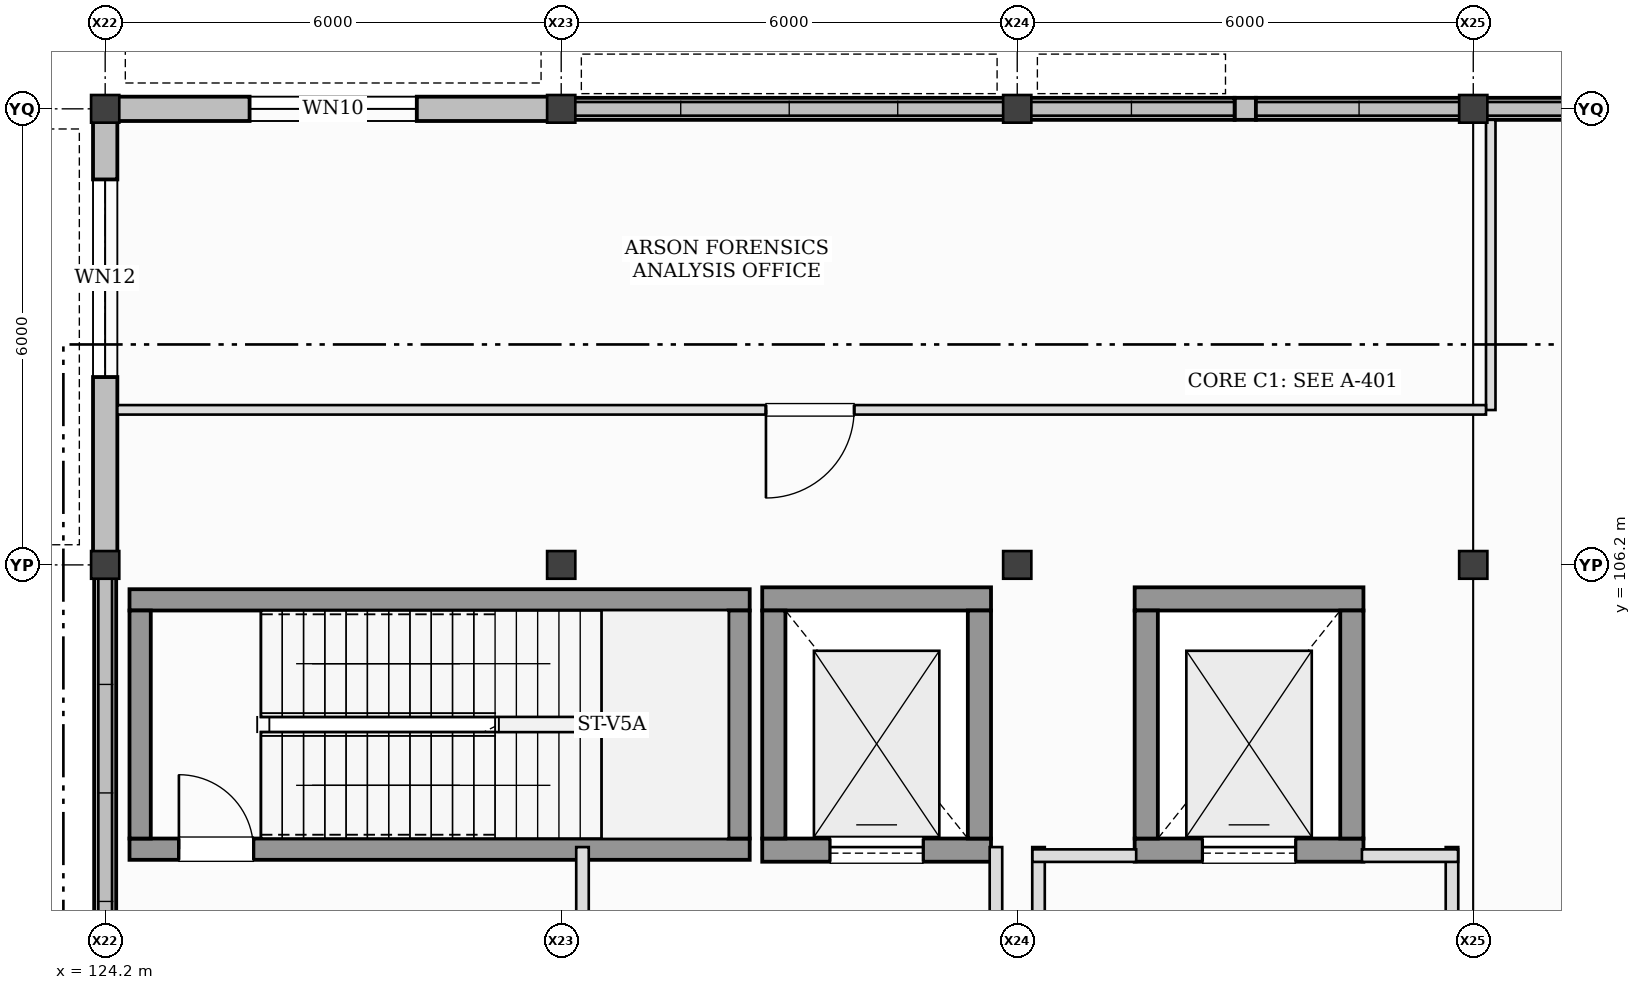
"""IFC4 building model, lengths in metres.
Left out: names, types, materials, properties, quantities, classifications, styles, units other than length and angle.
Written with IfcOpenShell. Run it as: python <this file> out.ifc"""

import sys

from ifc_helpers import new_model, si_unit, direction, frame, frame_2d, origin, origin_2d, place, context, subcontext, project, spatial, rectangle, i_section, extrude, element, fill, save


model = new_model("IFC4")
c1 = context("Model", 3, precision=1e-05, world=origin(), true_north=direction((0.0, 1.0)))
c2 = subcontext(c1, "Body", "Model", "MODEL_VIEW")
j1 = project(units=[si_unit("LENGTHUNIT", "METRE"), si_unit("PLANEANGLEUNIT", "RADIAN")], contexts=[c1])
p1 = place(None, origin())
s1 = spatial("IfcSite", under=j1, at=p1, CompositionType="ELEMENT")
p2 = place(p1, origin())
s2 = spatial("IfcBuilding", under=s1, at=p2, CompositionType="ELEMENT")
p3 = place(p2, frame((0.0, 0.0, 6.0)))
s3 = spatial("IfcBuildingStorey", under=s2, at=p3, CompositionType="ELEMENT", Elevation=6.0)
for number, where, z_axis, x_axis in (
    (1, (124.2, 106.2, 0.0), (0.0, 0.0, 1.0), (1.0, 0.0, 0.0)),
    (2, (124.2, 112.2, 0.0), (0.0, 0.0, 1.0), (1.0, 0.0, 0.0)),
    (3, (130.2, 106.2, 0.0), (0.0, 0.0, 1.0), (1.0, 0.0, 0.0)),
    (4, (130.2, 112.2, 0.0), (0.0, 0.0, 1.0), (1.0, 0.0, 0.0)),
    (5, (136.2, 106.2, 0.0), (0.0, 0.0, 1.0), (1.0, 0.0, 0.0)),
    (6, (136.2, 112.2, 0.0), (0.0, 0.0, 1.0), (1.0, 0.0, 0.0)),
    (7, (142.2, 106.2, 0.0), (0.0, 0.0, 1.0), (1.0, 0.0, 0.0)),
    (8, (142.2, 112.2, 0.0), (0.0, 0.0, 1.0), (1.0, 0.0, 0.0)),
):
    element("IfcColumn", number, at=place(p3, frame(where, z_axis=z_axis, x_axis=x_axis)), inside=s3, PredefinedType="COLUMN", context=c2, shape_type="SweptSolid", body=[
        extrude(i_section(OverallWidth=0.371, OverallDepth=0.364, WebThickness=0.013, FlangeThickness=0.022, at=origin_2d()), origin(), (0.0, 0.0, 1.0), 4.0),
    ])
p4 = place(p3, frame((130.055, 112.2, 0.0), z_axis=(0.0, 0.0, 1.0), x_axis=(-1.0, 0.0, 0.0)))
e9 = element("IfcWall", 9, at=p4, inside=s3, PredefinedType="STANDARD", context=c2, shape_type="SweptSolid", body=[
    extrude(rectangle(XDim=5.71, YDim=0.32, at=frame_2d((2.855, 0.0))), origin(), (0.0, 0.0, 1.0), 3.153),
])
p5 = place(p4, frame((1.755, 0.0, 1.0)))
e10 = element("IfcOpeningElement", 10, at=p5, cuts=e9, PredefinedType="OPENING", context=c2, shape_type="SweptSolid", body=[
    extrude(rectangle(XDim=2.2, YDim=1.36, at=frame_2d((1.1, 0.68))), frame((0.0, 0.17, 0.0), z_axis=(0.0, -1.0, 0.0), x_axis=(1.0, 0.0, 0.0)), (0.0, 0.0, 1.0), 0.34),
])
p6 = place(p3, frame((136.055, 112.2, 0.0), z_axis=(0.0, 0.0, 1.0), x_axis=(-1.0, 0.0, 0.0)))
e11 = element("IfcWall", 11, at=p6, inside=s3, PredefinedType="STANDARD", context=c2, shape_type="SweptSolid", body=[
    extrude(rectangle(XDim=5.71, YDim=0.29, at=frame_2d((2.855, 0.0))), origin(), (0.0, 0.0, 1.0), 0.32),
])
p7 = place(p3, frame((139.34, 112.2, 0.0), z_axis=(0.0, 0.0, 1.0), x_axis=(-1.0, 0.0, 0.0)))
e12 = element("IfcWall", 12, at=p7, inside=s3, PredefinedType="STANDARD", context=c2, shape_type="SweptSolid", body=[
    extrude(rectangle(XDim=0.28, YDim=0.29, at=frame_2d((0.14, 0.0))), origin(), (0.0, 0.0, 1.0), 3.153),
])
p8 = place(p3, frame((142.055, 112.2, 0.0), z_axis=(0.0, 0.0, 1.0), x_axis=(-1.0, 0.0, 0.0)))
e13 = element("IfcWall", 13, at=p8, inside=s3, PredefinedType="STANDARD", context=c2, shape_type="SweptSolid", body=[
    extrude(rectangle(XDim=2.715, YDim=0.29, at=frame_2d((1.357, 0.0))), origin(), (0.0, 0.0, 1.0), 0.44),
])
p9 = place(p3, frame((139.06, 112.2, 0.0), z_axis=(0.0, 0.0, 1.0), x_axis=(-1.0, 0.0, 0.0)))
e14 = element("IfcWall", 14, at=p9, inside=s3, PredefinedType="STANDARD", context=c2, shape_type="SweptSolid", body=[
    extrude(rectangle(XDim=2.715, YDim=0.29, at=frame_2d((1.357, 0.0))), origin(), (0.0, 0.0, 1.0), 0.56),
])
p10 = place(p3, frame((148.055, 112.2, 0.0), z_axis=(0.0, 0.0, 1.0), x_axis=(-1.0, 0.0, 0.0)))
e15 = element("IfcWall", 15, at=p10, inside=s3, PredefinedType="STANDARD", context=c2, shape_type="SweptSolid", body=[
    extrude(rectangle(XDim=5.71, YDim=0.29, at=frame_2d((2.855, 0.0))), origin(), (0.0, 0.0, 1.0), 0.68),
])
p11 = place(p3, frame((124.2, 106.055, 0.0), z_axis=(0.0, 0.0, 1.0), x_axis=(0.0, -1.0, 0.0)))
e16 = element("IfcWall", 16, at=p11, inside=s3, PredefinedType="STANDARD", context=c2, shape_type="SweptSolid", body=[
    extrude(rectangle(XDim=5.71, YDim=0.29, at=frame_2d((2.855, 0.0))), origin(), (0.0, 0.0, 1.0), 0.92),
])
p12 = place(p3, frame((124.2, 112.055, 0.0), z_axis=(0.0, 0.0, 1.0), x_axis=(0.0, -1.0, 0.0)))
e17 = element("IfcWall", 17, at=p12, inside=s3, PredefinedType="STANDARD", context=c2, shape_type="SweptSolid", body=[
    extrude(rectangle(XDim=5.71, YDim=0.32, at=frame_2d((2.855, 0.0))), origin(), (0.0, 0.0, 1.0), 3.157),
])
p13 = place(p12, frame((0.784, 0.0, 1.0)))
e18 = element("IfcOpeningElement", 18, at=p13, cuts=e17, PredefinedType="OPENING", context=c2, shape_type="SweptSolid", body=[
    extrude(rectangle(XDim=2.6, YDim=1.36, at=frame_2d((1.3, 0.68))), frame((0.0, 0.17, 0.0), z_axis=(0.0, -1.0, 0.0), x_axis=(1.0, 0.0, 0.0)), (0.0, 0.0, 1.0), 0.34),
])
p14 = place(p3, frame((124.52, 102.46, 0.0), z_axis=(0.0, 0.0, 1.0), x_axis=(1.0, 0.0, 0.0)))
e19 = element("IfcWall", 19, at=p14, inside=s3, PredefinedType="SHEAR", context=c2, shape_type="SweptSolid", body=[
    extrude(rectangle(XDim=8.16, YDim=0.28, at=frame_2d((4.08, 0.0))), origin(), (0.0, 0.0, 1.0), 4.0),
])
p15 = place(p14, frame((0.65, 0.0, 0.0)))
e20 = element("IfcOpeningElement", 20, at=p15, cuts=e19, PredefinedType="OPENING", context=c2, shape_type="SweptSolid", body=[
    extrude(rectangle(XDim=0.98, YDim=2.15, at=frame_2d((0.49, 1.075))), frame((0.0, 0.15, 0.0), z_axis=(0.0, -1.0, 0.0), x_axis=(1.0, 0.0, 0.0)), (0.0, 0.0, 1.0), 0.3),
])
p16 = place(p3, frame((132.68, 105.74, 0.0), z_axis=(0.0, 0.0, 1.0), x_axis=(-1.0, 0.0, 0.0)))
e21 = element("IfcWall", 21, at=p16, inside=s3, PredefinedType="SHEAR", context=c2, shape_type="SweptSolid", body=[
    extrude(rectangle(XDim=8.16, YDim=0.28, at=frame_2d((4.08, 0.0))), origin(), (0.0, 0.0, 1.0), 4.0),
])
for number, where, z_axis, x_axis in (
    (22, (124.66, 105.6, 0.0), (0.0, 0.0, 1.0), (0.0, -1.0, 0.0)),
    (23, (132.54, 102.6, 0.0), (0.0, 0.0, 1.0), (0.0, 1.0, 0.0)),
):
    element("IfcWall", number, at=place(p3, frame(where, z_axis=z_axis, x_axis=x_axis)), inside=s3, PredefinedType="SHEAR", context=c2, shape_type="SweptSolid", body=[
        extrude(rectangle(XDim=3.0, YDim=0.28, at=frame_2d((1.5, 0.0))), origin(), (0.0, 0.0, 1.0), 4.0),
    ])
p17 = place(p3, frame((132.845, 102.448, 0.0), z_axis=(0.0, 0.0, 1.0), x_axis=(1.0, 0.0, 0.0)))
e24 = element("IfcWall", 24, at=p17, inside=s3, PredefinedType="SHEAR", context=c2, shape_type="SweptSolid", body=[
    extrude(rectangle(XDim=3.01, YDim=0.305, at=frame_2d((1.505, 0.0))), origin(), (0.0, 0.0, 1.0), 4.0),
])
p18 = place(p17, frame((0.895, 0.0, 0.0)))
e25 = element("IfcOpeningElement", 25, at=p18, cuts=e24, PredefinedType="OPENING", context=c2, shape_type="SweptSolid", body=[
    extrude(rectangle(XDim=1.22, YDim=2.22, at=frame_2d((0.61, 1.11))), frame((0.0, 0.162, 0.0), z_axis=(0.0, -1.0, 0.0), x_axis=(1.0, 0.0, 0.0)), (0.0, 0.0, 1.0), 0.325),
])
p19 = place(p3, frame((135.855, 105.752, 0.0), z_axis=(0.0, 0.0, 1.0), x_axis=(-1.0, 0.0, 0.0)))
e26 = element("IfcWall", 26, at=p19, inside=s3, PredefinedType="SHEAR", context=c2, shape_type="SweptSolid", body=[
    extrude(rectangle(XDim=3.01, YDim=0.305, at=frame_2d((1.505, 0.0))), origin(), (0.0, 0.0, 1.0), 4.0),
])
for number, where, z_axis, x_axis in (
    (27, (132.998, 105.6, 0.0), (0.0, 0.0, 1.0), (0.0, -1.0, 0.0)),
    (28, (135.702, 102.6, 0.0), (0.0, 0.0, 1.0), (0.0, 1.0, 0.0)),
):
    element("IfcWall", number, at=place(p3, frame(where, z_axis=z_axis, x_axis=x_axis)), inside=s3, PredefinedType="SHEAR", context=c2, shape_type="SweptSolid", body=[
        extrude(rectangle(XDim=3.0, YDim=0.305, at=frame_2d((1.5, 0.0))), origin(), (0.0, 0.0, 1.0), 4.0),
    ])
for number, where, z_axis, x_axis in (
    (29, (130.48, 99.5, 0.0), (0.0, 0.0, 1.0), (0.0, 1.0, 0.0)),
    (30, (135.92, 102.488, 0.0), (0.0, 0.0, 1.0), (0.0, -1.0, 0.0)),
):
    element("IfcWall", number, at=place(p3, frame(where, z_axis=z_axis, x_axis=x_axis)), inside=s3, PredefinedType="PARTITIONING", context=c2, shape_type="SweptSolid", body=[
        extrude(rectangle(XDim=2.988, YDim=0.165, at=frame_2d((1.494, 0.0))), origin(), (0.0, 0.0, 1.0), 3.157),
    ])
p20 = place(p3, frame((137.745, 102.448, 0.0), z_axis=(0.0, 0.0, 1.0), x_axis=(1.0, 0.0, 0.0)))
e31 = element("IfcWall", 31, at=p20, inside=s3, PredefinedType="SHEAR", context=c2, shape_type="SweptSolid", body=[
    extrude(rectangle(XDim=3.01, YDim=0.305, at=frame_2d((1.505, 0.0))), origin(), (0.0, 0.0, 1.0), 4.0),
])
p21 = place(p20, frame((0.895, 0.0, 0.0)))
e32 = element("IfcOpeningElement", 32, at=p21, cuts=e31, PredefinedType="OPENING", context=c2, shape_type="SweptSolid", body=[
    extrude(rectangle(XDim=1.22, YDim=2.22, at=frame_2d((0.61, 1.11))), frame((0.0, 0.162, 0.0), z_axis=(0.0, -1.0, 0.0), x_axis=(1.0, 0.0, 0.0)), (0.0, 0.0, 1.0), 0.325),
])
p22 = place(p3, frame((140.755, 105.752, 0.0), z_axis=(0.0, 0.0, 1.0), x_axis=(-1.0, 0.0, 0.0)))
e33 = element("IfcWall", 33, at=p22, inside=s3, PredefinedType="SHEAR", context=c2, shape_type="SweptSolid", body=[
    extrude(rectangle(XDim=3.01, YDim=0.305, at=frame_2d((1.505, 0.0))), origin(), (0.0, 0.0, 1.0), 4.0),
])
for number, where, z_axis, x_axis in (
    (34, (137.897, 105.6, 0.0), (0.0, 0.0, 1.0), (0.0, -1.0, 0.0)),
    (35, (140.603, 102.6, 0.0), (0.0, 0.0, 1.0), (0.0, 1.0, 0.0)),
):
    element("IfcWall", number, at=place(p3, frame(where, z_axis=z_axis, x_axis=x_axis)), inside=s3, PredefinedType="SHEAR", context=c2, shape_type="SweptSolid", body=[
        extrude(rectangle(XDim=3.0, YDim=0.305, at=frame_2d((1.5, 0.0))), origin(), (0.0, 0.0, 1.0), 4.0),
    ])
for number, where, z_axis, x_axis in (
    (36, (136.48, 99.5, 0.0), (0.0, 0.0, 1.0), (0.0, 1.0, 0.0)),
    (37, (141.92, 102.488, 0.0), (0.0, 0.0, 1.0), (0.0, -1.0, 0.0)),
):
    element("IfcWall", number, at=place(p3, frame(where, z_axis=z_axis, x_axis=x_axis)), inside=s3, PredefinedType="PARTITIONING", context=c2, shape_type="SweptSolid", body=[
        extrude(rectangle(XDim=2.988, YDim=0.165, at=frame_2d((1.494, 0.0))), origin(), (0.0, 0.0, 1.0), 3.157),
    ])
p23 = place(p3, frame((136.4, 102.375, 0.0), z_axis=(0.0, 0.0, 1.0), x_axis=(1.0, 0.0, 0.0)))
e38 = element("IfcWall", 38, at=p23, inside=s3, PredefinedType="PARTITIONING", context=c2, shape_type="SweptSolid", body=[
    extrude(rectangle(XDim=1.365, YDim=0.165, at=frame_2d((0.683, 0.0))), origin(), (0.0, 0.0, 1.0), 3.72),
])
p24 = place(p3, frame((140.735, 102.375, 0.0), z_axis=(0.0, 0.0, 1.0), x_axis=(1.0, 0.0, 0.0)))
e39 = element("IfcWall", 39, at=p24, inside=s3, PredefinedType="PARTITIONING", context=c2, shape_type="SweptSolid", body=[
    extrude(rectangle(XDim=1.265, YDim=0.165, at=frame_2d((0.632, 0.0))), origin(), (0.0, 0.0, 1.0), 3.72),
])
p25 = place(p3, frame((142.43, 112.055, 0.0), z_axis=(0.0, 0.0, 1.0), x_axis=(0.0, -1.0, 0.0)))
e40 = element("IfcWall", 40, at=p25, inside=s3, PredefinedType="PARTITIONING", context=c2, shape_type="SweptSolid", body=[
    extrude(rectangle(XDim=3.817, YDim=0.125, at=frame_2d((1.909, 0.0))), origin(), (0.0, 0.0, 1.0), 3.157),
])
p26 = place(p3, frame((142.367, 108.24, 0.0), z_axis=(0.0, 0.0, 1.0), x_axis=(-1.0, 0.0, 0.0)))
e41 = element("IfcWall", 41, at=p26, inside=s3, PredefinedType="PARTITIONING", context=c2, shape_type="SweptSolid", body=[
    extrude(rectangle(XDim=18.007, YDim=0.125, at=frame_2d((9.004, 0.0))), origin(), (0.0, 0.0, 1.0), 3.72),
])
p27 = place(p26, frame((8.314, 0.0, 0.0)))
e42 = element("IfcOpeningElement", 42, at=p27, cuts=e41, PredefinedType="OPENING", context=c2, shape_type="SweptSolid", body=[
    extrude(rectangle(XDim=1.16, YDim=2.2, at=frame_2d((0.58, 1.1))), frame((0.0, 0.073, 0.0), z_axis=(0.0, -1.0, 0.0), x_axis=(1.0, 0.0, 0.0)), (0.0, 0.0, 1.0), 0.145),
])
p28 = place(p5, origin())
e43 = element("IfcWindow", 43, at=p28, inside=s3, PartitioningType="SINGLE_PANEL", PredefinedType="WINDOW", context=c2, shape_type="SweptSolid", body=[
    extrude(rectangle(XDim=2.2, YDim=1.36, at=frame_2d((1.1, 0.68))), frame((0.0, 0.03, 0.0), z_axis=(0.0, -1.0, 0.0), x_axis=(1.0, 0.0, 0.0)), (0.0, 0.0, 1.0), 0.06),
])
fill(e10, e43)
p29 = place(p13, origin())
e44 = element("IfcWindow", 44, at=p29, inside=s3, PartitioningType="SINGLE_PANEL", PredefinedType="WINDOW", context=c2, shape_type="SweptSolid", body=[
    extrude(rectangle(XDim=2.6, YDim=1.36, at=frame_2d((1.3, 0.68))), frame((0.0, 0.03, 0.0), z_axis=(0.0, -1.0, 0.0), x_axis=(1.0, 0.0, 0.0)), (0.0, 0.0, 1.0), 0.06),
])
fill(e18, e44)
p30 = place(p15, origin())
e45 = element("IfcDoor", 45, at=p30, inside=s3, OperationType="SINGLE_SWING_LEFT", PredefinedType="DOOR", context=c2, shape_type="SweptSolid", body=[
    extrude(rectangle(XDim=0.98, YDim=2.15, at=frame_2d((0.49, 1.075))), frame((0.0, 0.025, 0.0), z_axis=(0.0, -1.0, 0.0), x_axis=(1.0, 0.0, 0.0)), (0.0, 0.0, 1.0), 0.05),
])
fill(e20, e45)
p31 = place(p18, origin())
e46 = element("IfcDoor", 46, at=p31, inside=s3, OperationType="SLIDING_TO_LEFT", PredefinedType="DOOR", context=c2, shape_type="SweptSolid", body=[
    extrude(rectangle(XDim=1.22, YDim=2.22, at=frame_2d((0.61, 1.11))), frame((0.0, 0.025, 0.0), z_axis=(0.0, -1.0, 0.0), x_axis=(1.0, 0.0, 0.0)), (0.0, 0.0, 1.0), 0.05),
])
fill(e25, e46)
p32 = place(p21, origin())
e47 = element("IfcDoor", 47, at=p32, inside=s3, OperationType="SLIDING_TO_LEFT", PredefinedType="DOOR", context=c2, shape_type="SweptSolid", body=[
    extrude(rectangle(XDim=1.22, YDim=2.22, at=frame_2d((0.61, 1.11))), frame((0.0, 0.025, 0.0), z_axis=(0.0, -1.0, 0.0), x_axis=(1.0, 0.0, 0.0)), (0.0, 0.0, 1.0), 0.05),
])
fill(e32, e47)
p33 = place(p27, frame((1.16, 0.0, 0.0), z_axis=(0.0, 0.0, 1.0), x_axis=(-1.0, 0.0, 0.0)))
e48 = element("IfcDoor", 48, at=p33, inside=s3, OperationType="SINGLE_SWING_RIGHT", PredefinedType="DOOR", context=c2, shape_type="SweptSolid", body=[
    extrude(rectangle(XDim=1.16, YDim=2.2, at=frame_2d((0.58, 1.1))), frame((0.0, 0.025, 0.0), z_axis=(0.0, -1.0, 0.0), x_axis=(1.0, 0.0, 0.0)), (0.0, 0.0, 1.0), 0.05),
])
fill(e42, e48)
save(model, sys.argv[1])
